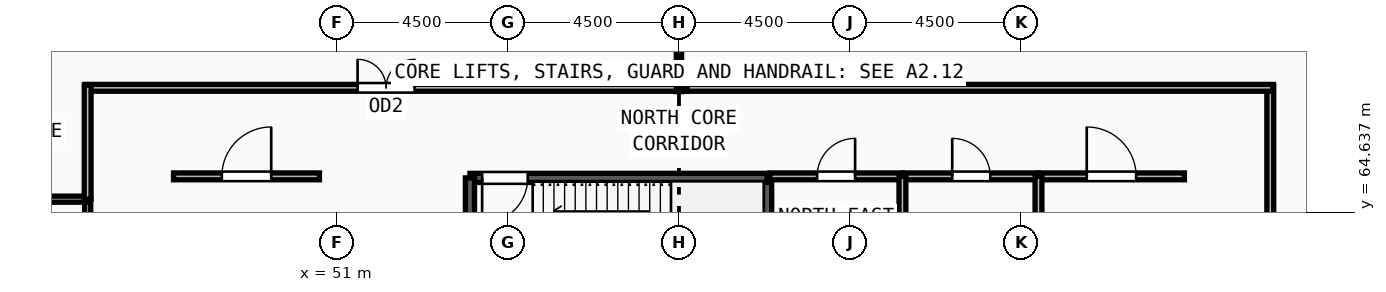
"""IFC4 building model, lengths in metres.
Left out: names, types, materials, properties, quantities, classifications, styles, units other than length and angle.
Written with IfcOpenShell. Run it as: python <this file> out.ifc"""

import sys

from ifc_helpers import new_model, si_unit, direction, frame, frame_2d, origin, place, context, subcontext, project, spatial, rectangle, extrude, source, transform, mapped, element, fill, save


model = new_model("IFC4")
c1 = context("Model", 3, precision=1e-05, world=origin(), true_north=direction((0.0, 1.0)))
c2 = subcontext(c1, "Body", "Model", "MODEL_VIEW")
j1 = project(units=[si_unit("LENGTHUNIT", "METRE"), si_unit("PLANEANGLEUNIT", "RADIAN")], contexts=[c1])
p1 = place(None, origin())
s1 = spatial("IfcSite", under=j1, at=p1, CompositionType="ELEMENT")
p2 = place(p1, origin())
s2 = spatial("IfcBuilding", under=s1, at=p2, CompositionType="ELEMENT")
p3 = place(p2, frame((0.0, 0.0, 97.5)))
s3 = spatial("IfcBuildingStorey", under=s2, at=p3, CompositionType="ELEMENT", Elevation=97.5)
p4 = place(p3, frame((62.32, 62.1, 0.0), z_axis=(0.0, 0.0, 1.0), x_axis=(0.0, 1.0, 0.0)))
e1 = element("IfcWall", 1, at=p4, inside=s3, PredefinedType="SOLIDWALL", context=c2, shape_type="SweptSolid", body=[
    extrude(rectangle(XDim=3.44, YDim=0.24, at=frame_2d((1.72, 0.0))), origin(), (0.0, 0.0, 1.0), 4.32),
])
p5 = place(p3, frame((62.32, 65.54, 0.0), z_axis=(0.0, 0.0, 1.0), x_axis=(-1.0, 0.0, 0.0)))
e2 = element("IfcWall", 2, at=p5, inside=s3, PredefinedType="SOLIDWALL", context=c2, shape_type="SweptSolid", body=[
    extrude(rectangle(XDim=7.82, YDim=0.24, at=frame_2d((3.91, 0.0))), origin(), (0.0, 0.0, 1.0), 4.32),
])
m1 = source(origin(), c2, "Body", "SweptSolid", [
    extrude(rectangle(XDim=1.2, YDim=2.2, at=frame_2d((0.6, 1.1))), frame((0.0, 0.13, 0.0), z_axis=(0.0, -1.0, 0.0), x_axis=(1.0, 0.0, 0.0)), (0.0, 0.0, 1.0), 0.26),
])
p6 = place(p5, frame((6.3, 0.0, 0.0)))
e3 = element("IfcOpeningElement", 3, at=p6, cuts=e2, PredefinedType="OPENING", context=c2, shape_type="MappedRepresentation", body=[
    mapped(m1, transform((0.0, 0.0, 0.0), x_axis=(1.0, 0.0, 0.0), y_axis=(0.0, 1.0, 0.0), z_axis=(0.0, 0.0, 1.0), scale=1.0)),
])
p7 = place(p3, frame((54.5, 65.54, 0.0), z_axis=(0.0, 0.0, 1.0), x_axis=(0.0, -1.0, 0.0)))
e4 = element("IfcWall", 4, at=p7, inside=s3, PredefinedType="SOLIDWALL", context=c2, shape_type="SweptSolid", body=[
    extrude(rectangle(XDim=3.44, YDim=0.24, at=frame_2d((1.72, 0.0))), origin(), (0.0, 0.0, 1.0), 4.32),
])
p8 = place(p3, frame((44.44, 62.24, 0.0), z_axis=(0.0, 0.0, 1.0), x_axis=(0.0, 1.0, 0.0)))
e5 = element("IfcWall", 5, at=p8, inside=s3, PredefinedType="PARTITIONING", context=c2, shape_type="SweptSolid", body=[
    extrude(rectangle(XDim=2.74, YDim=0.16, at=frame_2d((1.37, 0.0))), origin(), (0.0, 0.0, 1.0), 4.32),
])
m2 = source(origin(), c2, "Body", "SweptSolid", [
    extrude(rectangle(XDim=1.05, YDim=2.15, at=frame_2d((0.525, 1.075))), frame((0.0, 0.09, 0.0), z_axis=(0.0, -1.0, 0.0), x_axis=(1.0, 0.0, 0.0)), (0.0, 0.0, 1.0), 0.18),
])
p9 = place(p8, frame((0.845, 0.0, 0.0)))
e6 = element("IfcOpeningElement", 6, at=p9, cuts=e5, PredefinedType="OPENING", context=c2, shape_type="MappedRepresentation", body=[
    mapped(m2, transform((0.0, 0.0, 0.0), x_axis=(1.0, 0.0, 0.0), y_axis=(0.0, 1.0, 0.0), z_axis=(0.0, 0.0, 1.0), scale=1.0)),
])
p10 = place(p3, frame((62.39, 65.58, 0.0), z_axis=(0.0, 0.0, 1.0), x_axis=(1.0, 0.0, 0.0)))
e7 = element("IfcWall", 7, at=p10, inside=s3, PredefinedType="PARTITIONING", context=c2, shape_type="SweptSolid", body=[
    extrude(rectangle(XDim=3.49, YDim=0.18, at=frame_2d((1.745, 0.0))), origin(), (0.0, 0.0, 1.0), 4.32),
])
m3 = source(origin(), c2, "Body", "SweptSolid", [
    extrude(rectangle(XDim=1.0, YDim=2.2, at=frame_2d((0.5, 1.1))), frame((0.0, 0.1, 0.0), z_axis=(0.0, -1.0, 0.0), x_axis=(1.0, 0.0, 0.0)), (0.0, 0.0, 1.0), 0.2),
])
p11 = place(p10, frame((1.245, 0.0, 0.0)))
e8 = element("IfcOpeningElement", 8, at=p11, cuts=e7, PredefinedType="OPENING", context=c2, shape_type="MappedRepresentation", body=[
    mapped(m3, transform((0.0, 0.0, 0.0), x_axis=(1.0, 0.0, 0.0), y_axis=(0.0, 1.0, 0.0), z_axis=(0.0, 0.0, 1.0), scale=1.0)),
])
p12 = place(p3, frame((65.92, 65.58, 0.0), z_axis=(0.0, 0.0, 1.0), x_axis=(1.0, 0.0, 0.0)))
e9 = element("IfcWall", 9, at=p12, inside=s3, PredefinedType="PARTITIONING", context=c2, shape_type="SweptSolid", body=[
    extrude(rectangle(XDim=3.54, YDim=0.18, at=frame_2d((1.77, 0.0))), origin(), (0.0, 0.0, 1.0), 4.32),
])
p13 = place(p12, frame((1.27, 0.0, 0.0)))
e10 = element("IfcOpeningElement", 10, at=p13, cuts=e9, PredefinedType="OPENING", context=c2, shape_type="MappedRepresentation", body=[
    mapped(m3, transform((0.0, 0.0, 0.0), x_axis=(1.0, 0.0, 0.0), y_axis=(0.0, 1.0, 0.0), z_axis=(0.0, 0.0, 1.0), scale=1.0)),
])
p14 = place(p3, frame((46.7, 65.58, 0.0), z_axis=(0.0, 0.0, 1.0), x_axis=(1.0, 0.0, 0.0)))
e11 = element("IfcWall", 11, at=p14, inside=s3, PredefinedType="PARTITIONING", context=c2, shape_type="SweptSolid", body=[
    extrude(rectangle(XDim=3.84, YDim=0.18, at=frame_2d((1.92, 0.0))), origin(), (0.0, 0.0, 1.0), 4.32),
])
m4 = source(origin(), c2, "Body", "SweptSolid", [
    extrude(rectangle(XDim=1.3, YDim=2.2, at=frame_2d((0.65, 1.1))), frame((0.0, 0.1, 0.0), z_axis=(0.0, -1.0, 0.0), x_axis=(1.0, 0.0, 0.0)), (0.0, 0.0, 1.0), 0.2),
])
p15 = place(p14, frame((1.27, 0.0, 0.0)))
e12 = element("IfcOpeningElement", 12, at=p15, cuts=e11, PredefinedType="OPENING", context=c2, shape_type="MappedRepresentation", body=[
    mapped(m4, transform((0.0, 0.0, 0.0), x_axis=(1.0, 0.0, 0.0), y_axis=(0.0, 1.0, 0.0), z_axis=(0.0, 0.0, 1.0), scale=1.0)),
])
p16 = place(p3, frame((69.46, 65.58, 0.0), z_axis=(0.0, 0.0, 1.0), x_axis=(1.0, 0.0, 0.0)))
e13 = element("IfcWall", 13, at=p16, inside=s3, PredefinedType="PARTITIONING", context=c2, shape_type="SweptSolid", body=[
    extrude(rectangle(XDim=3.84, YDim=0.18, at=frame_2d((1.92, 0.0))), origin(), (0.0, 0.0, 1.0), 4.32),
])
p17 = place(p16, frame((1.27, 0.0, 0.0)))
e14 = element("IfcOpeningElement", 14, at=p17, cuts=e13, PredefinedType="OPENING", context=c2, shape_type="MappedRepresentation", body=[
    mapped(m4, transform((0.0, 0.0, 0.0), x_axis=(1.0, 0.0, 0.0), y_axis=(0.0, 1.0, 0.0), z_axis=(0.0, 0.0, 1.0), scale=1.0)),
])
p18 = place(p3, frame((75.56, 67.98, 0.0), z_axis=(0.0, 0.0, 1.0), x_axis=(0.0, -1.0, 0.0)))
e15 = element("IfcWall", 15, at=p18, inside=s3, PredefinedType="PARTITIONING", context=c2, shape_type="SweptSolid", body=[
    extrude(rectangle(XDim=23.195, YDim=0.18, at=frame_2d((11.598, 0.0))), origin(), (0.0, 0.0, 1.0), 4.32),
])
m5 = source(origin(), c2, "Body", "SweptSolid", [
    extrude(rectangle(XDim=1.5, YDim=2.2, at=frame_2d((0.75, 1.1))), frame((0.0, 0.1, 0.0), z_axis=(0.0, -1.0, 0.0), x_axis=(1.0, 0.0, 0.0)), (0.0, 0.0, 1.0), 0.2),
])
p19 = place(p18, frame((10.848, 0.0, 0.0)))
e16 = element("IfcOpeningElement", 16, at=p19, cuts=e15, PredefinedType="OPENING", context=c2, shape_type="MappedRepresentation", body=[
    mapped(m5, transform((0.0, 0.0, 0.0), x_axis=(1.0, 0.0, 0.0), y_axis=(0.0, 1.0, 0.0), z_axis=(0.0, 0.0, 1.0), scale=1.0)),
])
p20 = place(p3, frame((44.37, 67.91, 0.0), z_axis=(0.0, 0.0, 1.0), x_axis=(1.0, 0.0, 0.0)))
e17 = element("IfcWall", 17, at=p20, inside=s3, PredefinedType="PARTITIONING", context=c2, shape_type="SweptSolid", body=[
    extrude(rectangle(XDim=15.845, YDim=0.18, at=frame_2d((7.922, 0.0))), origin(), (0.0, 0.0, 1.0), 4.32),
])
p21 = place(p20, frame((7.173, 0.0, 0.0)))
e18 = element("IfcOpeningElement", 18, at=p21, cuts=e17, PredefinedType="OPENING", context=c2, shape_type="MappedRepresentation", body=[
    mapped(m5, transform((0.0, 0.0, 0.0), x_axis=(1.0, 0.0, 0.0), y_axis=(0.0, 1.0, 0.0), z_axis=(0.0, 0.0, 1.0), scale=1.0)),
])
p22 = place(p3, frame((39.98, 64.98, 0.0), z_axis=(0.0, 0.0, 1.0), x_axis=(1.0, 0.0, 0.0)))
e19 = element("IfcWall", 19, at=p22, inside=s3, PredefinedType="PARTITIONING", context=c2, shape_type="SweptSolid", body=[
    extrude(rectangle(XDim=4.46, YDim=0.16, at=frame_2d((2.23, 0.0))), origin(), (0.0, 0.0, 1.0), 4.32),
])
for number, where, z_axis, x_axis in (
    (20, (65.88, 61.95, 0.0), (0.0, 0.0, 1.0), (0.0, 1.0, 0.0)),
    (21, (69.46, 61.95, 0.0), (0.0, 0.0, 1.0), (0.0, 1.0, 0.0)),
):
    element("IfcWall", number, at=place(p3, frame(where, z_axis=z_axis, x_axis=x_axis)), inside=s3, PredefinedType="PARTITIONING", context=c2, shape_type="SweptSolid", body=[
        extrude(rectangle(XDim=3.63, YDim=0.18, at=frame_2d((1.815, 0.0))), origin(), (0.0, 0.0, 1.0), 4.32),
    ])
p23 = place(p3, frame((60.215, 67.91, 0.0), z_axis=(0.0, 0.0, 1.0), x_axis=(1.0, 0.0, 0.0)))
e22 = element("IfcWall", 22, at=p23, inside=s3, PredefinedType="PARTITIONING", context=c2, shape_type="SweptSolid", body=[
    extrude(rectangle(XDim=15.415, YDim=0.18, at=frame_2d((7.708, 0.0))), origin(), (0.0, 0.0, 1.0), 4.32),
])
p24 = place(p3, frame((44.44, 64.98, 0.0), z_axis=(0.0, 0.0, 1.0), x_axis=(0.0, 1.0, 0.0)))
e23 = element("IfcWall", 23, at=p24, inside=s3, PredefinedType="PARTITIONING", context=c2, shape_type="SweptSolid", body=[
    extrude(rectangle(XDim=3.0, YDim=0.18, at=frame_2d((1.5, 0.0))), origin(), (0.0, 0.0, 1.0), 4.32),
])
p25 = place(p3, frame((60.0, 67.81, 0.0), z_axis=(0.0, 0.0, 1.0), x_axis=(0.0, 1.0, 0.0)))
e24 = element("IfcWall", 24, at=p25, inside=s3, PredefinedType="PARTITIONING", context=c2, shape_type="SweptSolid", body=[
    extrude(rectangle(XDim=13.605, YDim=0.14, at=frame_2d((6.802, 0.0))), origin(), (0.0, 0.0, 1.0), 4.32),
])
m6 = source(origin(), c2, "Body", "SweptSolid", [
    extrude(rectangle(XDim=1.2, YDim=2.2, at=frame_2d((0.6, 1.1))), frame((0.0, 0.025, 0.0), z_axis=(0.0, -1.0, 0.0), x_axis=(1.0, 0.0, 0.0)), (0.0, 0.0, 1.0), 0.05),
])
p26 = place(p6, origin())
e25 = element("IfcDoor", 25, at=p26, inside=s3, OperationType="SINGLE_SWING_RIGHT", PredefinedType="DOOR", context=c2, shape_type="MappedRepresentation", body=[
    mapped(m6, transform((0.0, 0.0, 0.0), x_axis=(1.0, 0.0, 0.0), y_axis=(0.0, 1.0, 0.0), z_axis=(0.0, 0.0, 1.0), scale=1.0)),
])
fill(e3, e25)
m7 = source(origin(), c2, "Body", "SweptSolid", [
    extrude(rectangle(XDim=1.0, YDim=2.2, at=frame_2d((0.5, 1.1))), frame((0.0, 0.025, 0.0), z_axis=(0.0, -1.0, 0.0), x_axis=(1.0, 0.0, 0.0)), (0.0, 0.0, 1.0), 0.05),
])
p27 = place(p11, origin())
e26 = element("IfcDoor", 26, at=p27, inside=s3, OperationType="SINGLE_SWING_RIGHT", PredefinedType="DOOR", context=c2, shape_type="MappedRepresentation", body=[
    mapped(m7, transform((0.0, 0.0, 0.0), x_axis=(1.0, 0.0, 0.0), y_axis=(0.0, 1.0, 0.0), z_axis=(0.0, 0.0, 1.0), scale=1.0)),
])
fill(e8, e26)
p28 = place(p13, origin())
e27 = element("IfcDoor", 27, at=p28, inside=s3, OperationType="SINGLE_SWING_LEFT", PredefinedType="DOOR", context=c2, shape_type="MappedRepresentation", body=[
    mapped(m7, transform((0.0, 0.0, 0.0), x_axis=(1.0, 0.0, 0.0), y_axis=(0.0, 1.0, 0.0), z_axis=(0.0, 0.0, 1.0), scale=1.0)),
])
fill(e10, e27)
m8 = source(origin(), c2, "Body", "SweptSolid", [
    extrude(rectangle(XDim=1.3, YDim=2.2, at=frame_2d((0.65, 1.1))), frame((0.0, 0.025, 0.0), z_axis=(0.0, -1.0, 0.0), x_axis=(1.0, 0.0, 0.0)), (0.0, 0.0, 1.0), 0.05),
])
p29 = place(p15, origin())
e28 = element("IfcDoor", 28, at=p29, inside=s3, OperationType="SINGLE_SWING_RIGHT", PredefinedType="DOOR", context=c2, shape_type="MappedRepresentation", body=[
    mapped(m8, transform((0.0, 0.0, 0.0), x_axis=(1.0, 0.0, 0.0), y_axis=(0.0, 1.0, 0.0), z_axis=(0.0, 0.0, 1.0), scale=1.0)),
])
fill(e12, e28)
p30 = place(p17, origin())
e29 = element("IfcDoor", 29, at=p30, inside=s3, OperationType="SINGLE_SWING_LEFT", PredefinedType="DOOR", context=c2, shape_type="MappedRepresentation", body=[
    mapped(m8, transform((0.0, 0.0, 0.0), x_axis=(1.0, 0.0, 0.0), y_axis=(0.0, 1.0, 0.0), z_axis=(0.0, 0.0, 1.0), scale=1.0)),
])
fill(e14, e29)
m9 = source(origin(), c2, "Body", "SweptSolid", [
    extrude(rectangle(XDim=1.5, YDim=2.2, at=frame_2d((0.75, 1.1))), frame((0.0, 0.025, 0.0), z_axis=(0.0, -1.0, 0.0), x_axis=(1.0, 0.0, 0.0)), (0.0, 0.0, 1.0), 0.05),
])
p31 = place(p21, origin())
e30 = element("IfcDoor", 30, at=p31, inside=s3, OperationType="DOUBLE_DOOR_SINGLE_SWING", PredefinedType="DOOR", context=c2, shape_type="MappedRepresentation", body=[
    mapped(m9, transform((0.0, 0.0, 0.0), x_axis=(1.0, 0.0, 0.0), y_axis=(0.0, 1.0, 0.0), z_axis=(0.0, 0.0, 1.0), scale=1.0)),
])
fill(e18, e30)
save(model, sys.argv[1])
